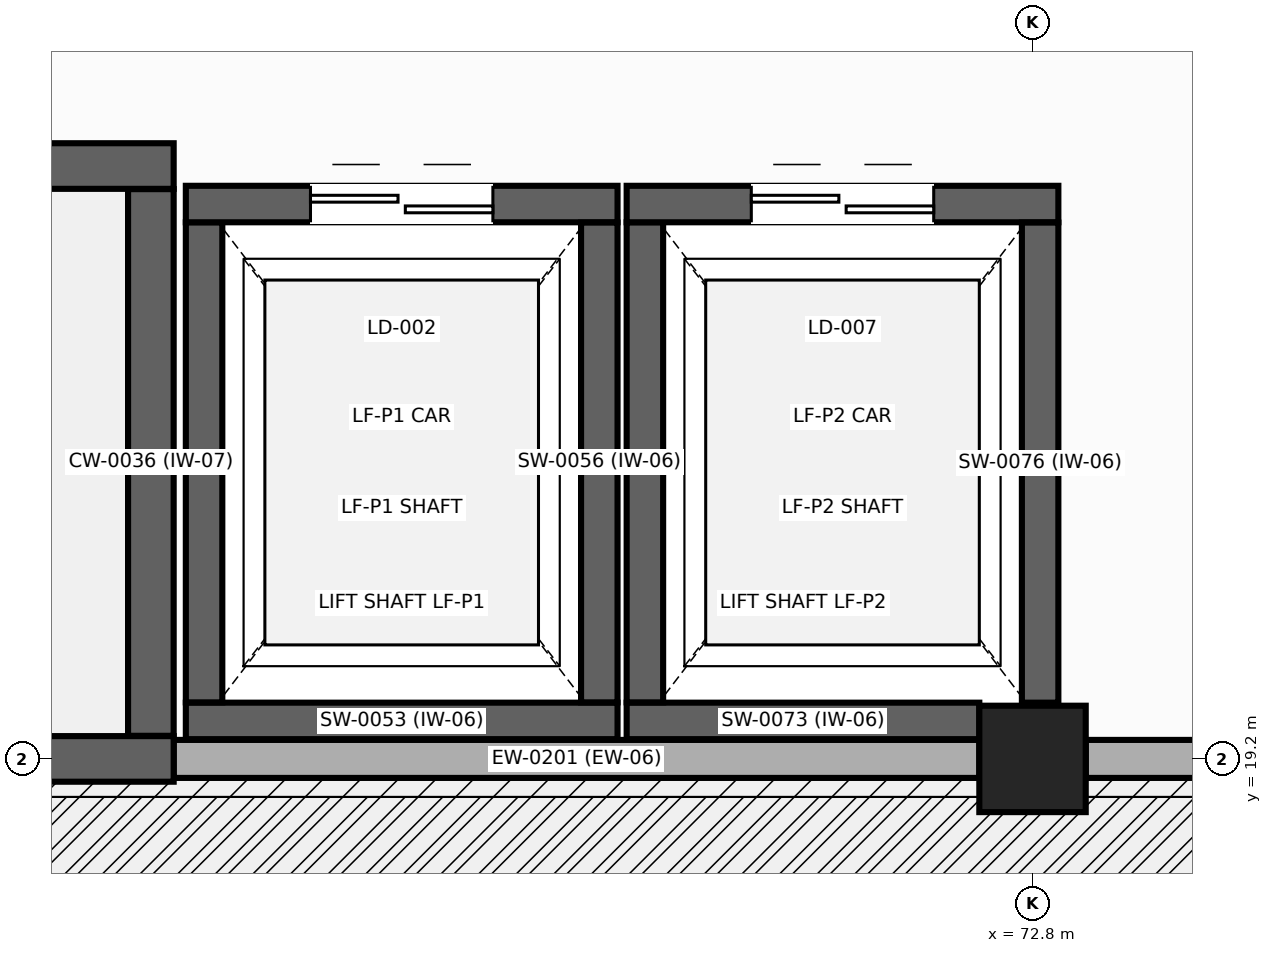
"""IFC4 building model, lengths in metres.
Left out: names, types, materials, properties, quantities, classifications, styles, units other than length and angle.
Written with IfcOpenShell. Run it as: python <this file> out.ifc"""

import sys

from ifc_helpers import new_model, si_unit, direction, frame, frame_2d, origin, origin_2d, place, context, subcontext, project, spatial, rectangle, extrude, element, fill, save


model = new_model("IFC4")
c1 = context("Model", 3, precision=1e-05, world=origin(), true_north=direction((0.0, 1.0)))
c2 = subcontext(c1, "Body", "Model", "MODEL_VIEW")
j1 = project(units=[si_unit("LENGTHUNIT", "METRE"), si_unit("PLANEANGLEUNIT", "RADIAN")], contexts=[c1])
p1 = place(None, origin())
s1 = spatial("IfcSite", under=j1, at=p1, CompositionType="ELEMENT")
p2 = place(p1, origin())
s2 = spatial("IfcBuilding", under=s1, at=p2, CompositionType="ELEMENT")
p3 = place(p2, origin())
s3 = spatial("IfcBuildingStorey", under=s2, at=p3, CompositionType="ELEMENT", Elevation=0.0)
p4 = place(p3, frame((72.8, 19.2, 0.0), z_axis=(0.0, 0.0, 1.0), x_axis=(1.0, 0.0, 0.0)))
e1 = element("IfcColumn", 1, at=p4, inside=s3, PredefinedType="COLUMN", context=c2, shape_type="SweptSolid", body=[
    extrude(rectangle(XDim=0.7, YDim=0.7, at=origin_2d()), origin(), (0.0, 0.0, 1.0), 5.4),
])
p5 = place(p3, frame((79.65, 19.2, 0.0), z_axis=(0.0, 0.0, 1.0), x_axis=(-1.0, 0.0, 0.0)))
e2 = element("IfcWall", 2, at=p5, inside=s3, PredefinedType="SOLIDWALL", context=c2, shape_type="SweptSolid", body=[
    extrude(rectangle(XDim=6.5, YDim=0.25, at=frame_2d((3.25, 0.0))), origin(), (0.0, 0.0, 1.0), 4.395),
])
p6 = place(p5, frame((2.05, 0.0, 0.0)))
e3 = element("IfcOpeningElement", 3, at=p6, cuts=e2, PredefinedType="OPENING", context=c2, shape_type="SweptSolid", body=[
    extrude(rectangle(XDim=2.4, YDim=2.7, at=frame_2d((1.2, 1.35))), frame((0.0, 0.135, 0.0), z_axis=(0.0, -1.0, 0.0), x_axis=(1.0, 0.0, 0.0)), (0.0, 0.0, 1.0), 0.27),
])
p7 = place(p3, frame((72.45, 19.2, 0.0), z_axis=(0.0, 0.0, 1.0), x_axis=(-1.0, 0.0, 0.0)))
e4 = element("IfcWall", 4, at=p7, inside=s3, PredefinedType="SOLIDWALL", context=c2, shape_type="SweptSolid", body=[
    extrude(rectangle(XDim=5.3, YDim=0.25, at=frame_2d((2.65, 0.0))), origin(), (0.0, 0.0, 1.0), 4.645),
])
p8 = place(p3, frame((67.15, 19.2, 0.0), z_axis=(0.0, 0.0, 1.0), x_axis=(-1.0, 0.0, 0.0)))
e5 = element("IfcWall", 5, at=p8, inside=s3, PredefinedType="SHEAR", context=c2, shape_type="SweptSolid", body=[
    extrude(rectangle(XDim=8.4, YDim=0.3, at=frame_2d((4.2, 0.0))), origin(), (0.0, 0.0, 1.0), 5.1),
])
p9 = place(p8, frame((6.625, 0.0, 0.0)))
e6 = element("IfcOpeningElement", 6, at=p9, cuts=e5, PredefinedType="OPENING", context=c2, shape_type="SweptSolid", body=[
    extrude(rectangle(XDim=1.35, YDim=2.2, at=frame_2d((0.675, 1.1))), frame((0.0, 0.16, 0.0), z_axis=(0.0, -1.0, 0.0), x_axis=(1.0, 0.0, 0.0)), (0.0, 0.0, 1.0), 0.32),
])
p10 = place(p3, frame((58.75, 23.1, 0.0), z_axis=(0.0, 0.0, 1.0), x_axis=(1.0, 0.0, 0.0)))
e7 = element("IfcWall", 7, at=p10, inside=s3, PredefinedType="SHEAR", context=c2, shape_type="SweptSolid", body=[
    extrude(rectangle(XDim=8.4, YDim=0.3, at=frame_2d((4.2, 0.0))), origin(), (0.0, 0.0, 1.0), 5.1),
])
p11 = place(p10, frame((0.37, 0.0, 0.0)))
e8 = element("IfcOpeningElement", 8, at=p11, cuts=e7, PredefinedType="OPENING", context=c2, shape_type="SweptSolid", body=[
    extrude(rectangle(XDim=1.1, YDim=2.15, at=frame_2d((0.55, 1.075))), frame((0.0, 0.16, 0.0), z_axis=(0.0, -1.0, 0.0), x_axis=(1.0, 0.0, 0.0)), (0.0, 0.0, 1.0), 0.32),
])
p12 = place(p3, frame((67.0, 22.948, 0.0), z_axis=(0.0, 0.0, 1.0), x_axis=(0.0, -1.0, 0.0)))
e9 = element("IfcWall", 9, at=p12, inside=s3, PredefinedType="SHEAR", context=c2, shape_type="SweptSolid", body=[
    extrude(rectangle(XDim=3.596, YDim=0.3, at=frame_2d((1.798, 0.0))), origin(), (0.0, 0.0, 1.0), 5.1),
])
p13 = place(p3, frame((70.07, 19.45, 0.0), z_axis=(0.0, 0.0, 1.0), x_axis=(-1.0, 0.0, 0.0)))
e10 = element("IfcWall", 10, at=p13, inside=s3, PredefinedType="SHEAR", context=c2, shape_type="SweptSolid", body=[
    extrude(rectangle(XDim=2.84, YDim=0.24, at=frame_2d((1.42, 0.0))), origin(), (0.0, 0.0, 1.0), 5.1),
])
p14 = place(p3, frame((67.35, 19.572, 0.0), z_axis=(0.0, 0.0, 1.0), x_axis=(0.0, 1.0, 0.0)))
e11 = element("IfcWall", 11, at=p14, inside=s3, PredefinedType="SHEAR", context=c2, shape_type="SweptSolid", body=[
    extrude(rectangle(XDim=3.158, YDim=0.24, at=frame_2d((1.579, 0.0))), origin(), (0.0, 0.0, 1.0), 5.1),
])
p15 = place(p3, frame((67.23, 22.85, 0.0), z_axis=(0.0, 0.0, 1.0), x_axis=(1.0, 0.0, 0.0)))
e12 = element("IfcWall", 12, at=p15, inside=s3, PredefinedType="SHEAR", context=c2, shape_type="SweptSolid", body=[
    extrude(rectangle(XDim=2.84, YDim=0.24, at=frame_2d((1.42, 0.0))), origin(), (0.0, 0.0, 1.0), 5.1),
])
p16 = place(p15, frame((0.82, 0.0, 0.0)))
e13 = element("IfcOpeningElement", 13, at=p16, cuts=e12, PredefinedType="OPENING", context=c2, shape_type="SweptSolid", body=[
    extrude(rectangle(XDim=1.2, YDim=2.15, at=frame_2d((0.6, 1.075))), frame((0.0, 0.13, 0.0), z_axis=(0.0, -1.0, 0.0), x_axis=(1.0, 0.0, 0.0)), (0.0, 0.0, 1.0), 0.26),
])
p17 = place(p3, frame((69.95, 22.728, 0.0), z_axis=(0.0, 0.0, 1.0), x_axis=(0.0, -1.0, 0.0)))
e14 = element("IfcWall", 14, at=p17, inside=s3, PredefinedType="SHEAR", context=c2, shape_type="SweptSolid", body=[
    extrude(rectangle(XDim=3.156, YDim=0.24, at=frame_2d((1.578, 0.0))), origin(), (0.0, 0.0, 1.0), 5.1),
])
p18 = place(p3, frame((72.45, 19.45, 0.0), z_axis=(0.0, 0.0, 1.0), x_axis=(-1.0, 0.0, 0.0)))
e15 = element("IfcWall", 15, at=p18, inside=s3, PredefinedType="SHEAR", context=c2, shape_type="SweptSolid", body=[
    extrude(rectangle(XDim=2.32, YDim=0.24, at=frame_2d((1.16, 0.0))), origin(), (0.0, 0.0, 1.0), 5.1),
])
p19 = place(p3, frame((70.25, 19.572, 0.0), z_axis=(0.0, 0.0, 1.0), x_axis=(0.0, 1.0, 0.0)))
e16 = element("IfcWall", 16, at=p19, inside=s3, PredefinedType="SHEAR", context=c2, shape_type="SweptSolid", body=[
    extrude(rectangle(XDim=3.158, YDim=0.24, at=frame_2d((1.579, 0.0))), origin(), (0.0, 0.0, 1.0), 5.1),
])
p20 = place(p3, frame((70.13, 22.85, 0.0), z_axis=(0.0, 0.0, 1.0), x_axis=(1.0, 0.0, 0.0)))
e17 = element("IfcWall", 17, at=p20, inside=s3, PredefinedType="SHEAR", context=c2, shape_type="SweptSolid", body=[
    extrude(rectangle(XDim=2.84, YDim=0.24, at=frame_2d((1.42, 0.0))), origin(), (0.0, 0.0, 1.0), 5.1),
])
p21 = place(p20, frame((0.82, 0.0, 0.0)))
e18 = element("IfcOpeningElement", 18, at=p21, cuts=e17, PredefinedType="OPENING", context=c2, shape_type="SweptSolid", body=[
    extrude(rectangle(XDim=1.2, YDim=2.15, at=frame_2d((0.6, 1.075))), frame((0.0, 0.13, 0.0), z_axis=(0.0, -1.0, 0.0), x_axis=(1.0, 0.0, 0.0)), (0.0, 0.0, 1.0), 0.26),
])
p22 = place(p3, frame((72.85, 22.728, 0.0), z_axis=(0.0, 0.0, 1.0), x_axis=(0.0, -1.0, 0.0)))
e19 = element("IfcWall", 19, at=p22, inside=s3, PredefinedType="SHEAR", context=c2, shape_type="SweptSolid", body=[
    extrude(rectangle(XDim=3.158, YDim=0.24, at=frame_2d((1.579, 0.0))), origin(), (0.0, 0.0, 1.0), 5.1),
])
p23 = place(p16, origin())
e20 = element("IfcDoor", 20, at=p23, inside=s3, OperationType="DOUBLE_DOOR_SLIDING", PredefinedType="DOOR", context=c2, shape_type="SweptSolid", body=[
    extrude(rectangle(XDim=1.2, YDim=2.15, at=frame_2d((0.6, 1.075))), frame((0.0, 0.025, 0.0), z_axis=(0.0, -1.0, 0.0), x_axis=(1.0, 0.0, 0.0)), (0.0, 0.0, 1.0), 0.05),
])
fill(e13, e20)
p24 = place(p21, origin())
e21 = element("IfcDoor", 21, at=p24, inside=s3, OperationType="DOUBLE_DOOR_SLIDING", PredefinedType="DOOR", context=c2, shape_type="SweptSolid", body=[
    extrude(rectangle(XDim=1.2, YDim=2.15, at=frame_2d((0.6, 1.075))), frame((0.0, 0.025, 0.0), z_axis=(0.0, -1.0, 0.0), x_axis=(1.0, 0.0, 0.0)), (0.0, 0.0, 1.0), 0.05),
])
fill(e18, e21)
save(model, sys.argv[1])
